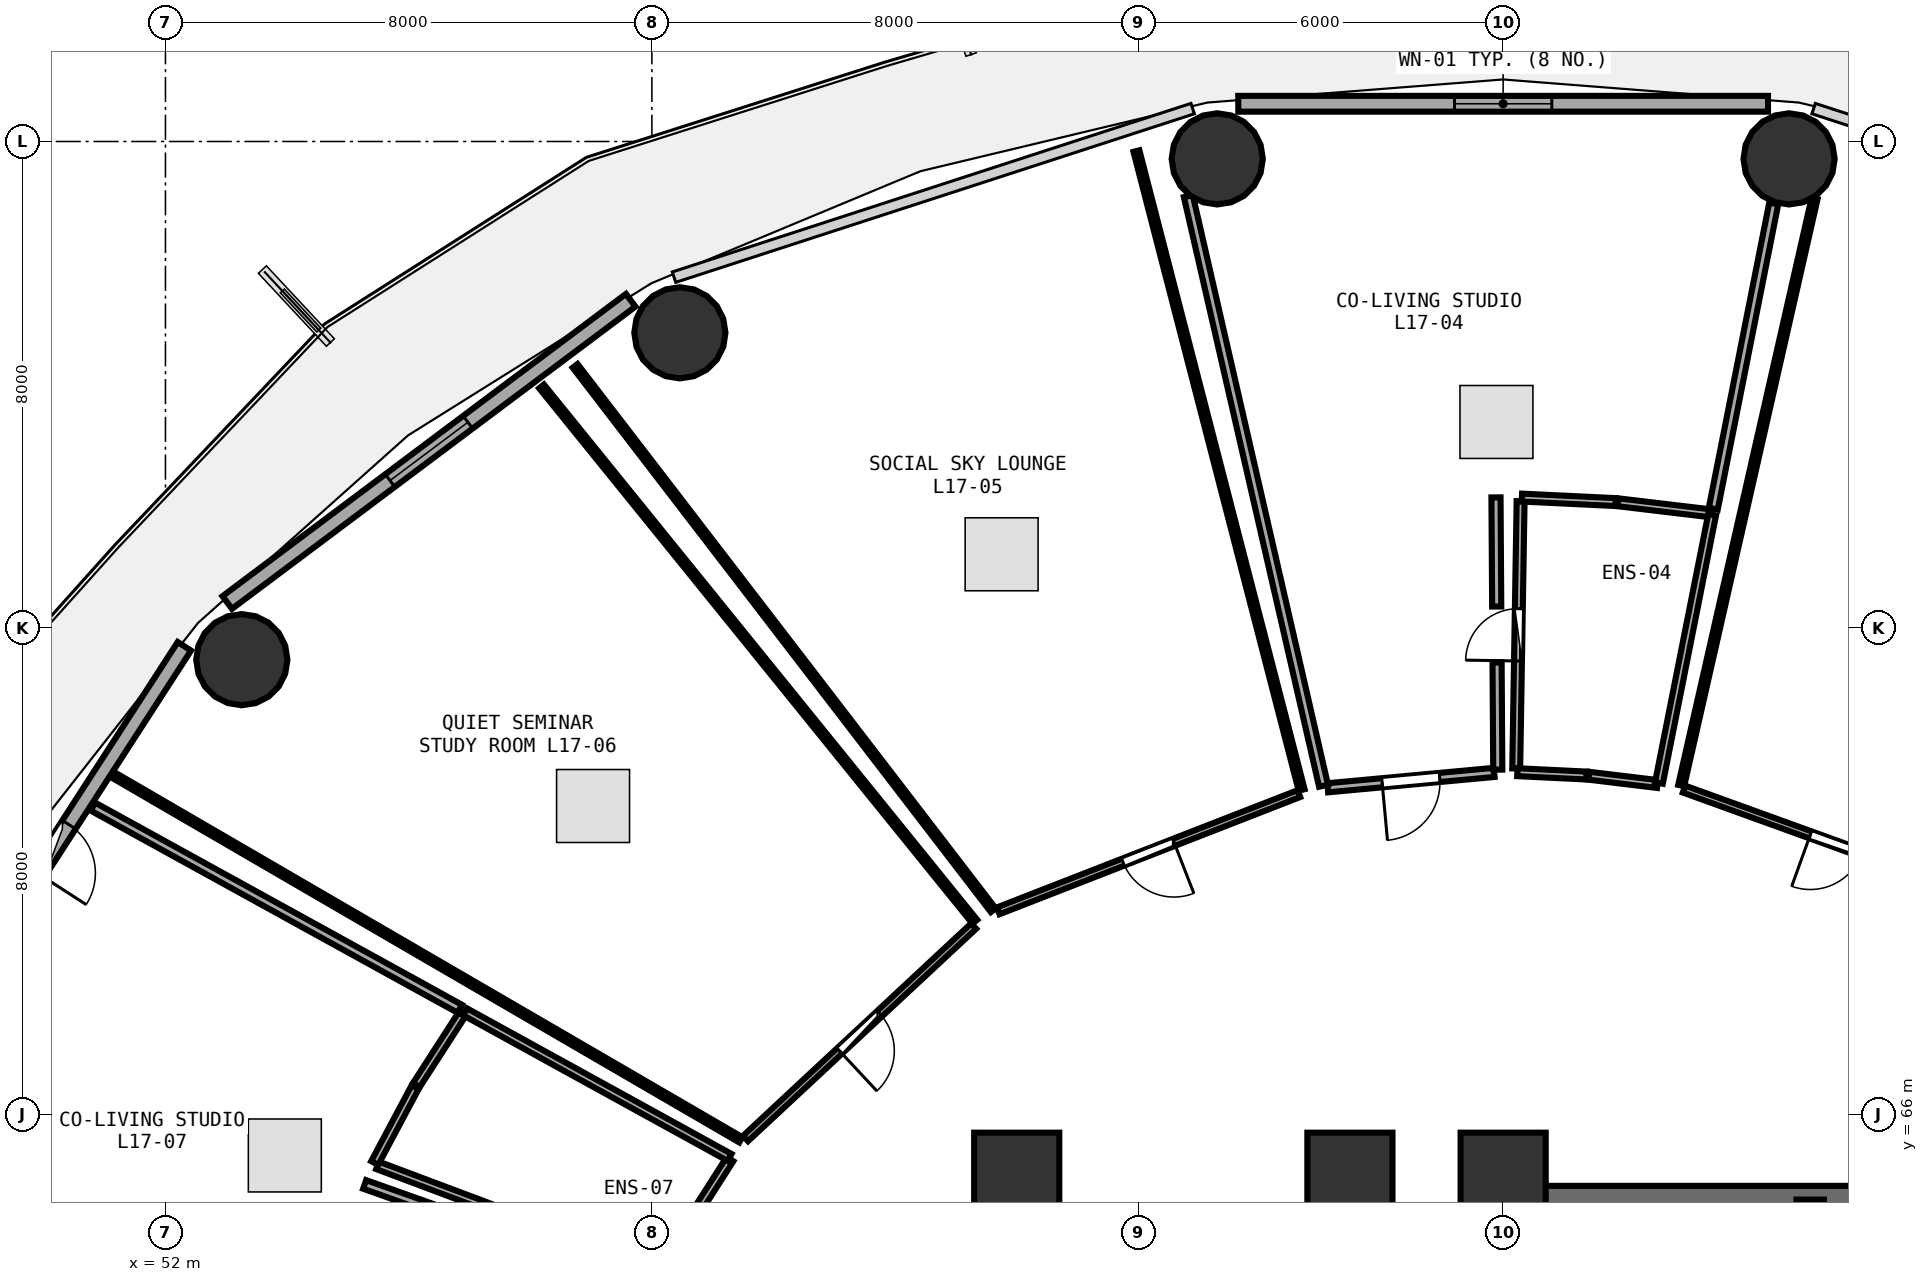
"""IFC4 building model, lengths in metres.
Left out: names, types, materials, properties, quantities, classifications, styles, units other than length and angle.
Written with IfcOpenShell. Run it as: python <this file> out.ifc"""

import sys

from ifc_helpers import new_model, si_unit, direction, frame, frame_2d, origin, origin_2d, place, context, subcontext, project, spatial, rectangle, circle, extrude, element, fill, save


model = new_model("IFC4")
c1 = context("Model", 3, precision=1e-05, world=origin(), true_north=direction((0.0, 1.0)))
c2 = subcontext(c1, "Body", "Model", "MODEL_VIEW")
j1 = project(units=[si_unit("LENGTHUNIT", "METRE"), si_unit("PLANEANGLEUNIT", "RADIAN")], contexts=[c1])
p1 = place(None, origin())
s1 = spatial("IfcSite", under=j1, at=p1, CompositionType="ELEMENT")
p2 = place(p1, origin())
s2 = spatial("IfcBuilding", under=s1, at=p2, CompositionType="ELEMENT")
p3 = place(p2, frame((0.0, 0.0, 67.5)))
s3 = spatial("IfcBuildingStorey", under=s2, at=p3, CompositionType="ELEMENT", Elevation=67.5)
for number, where, z_axis, x_axis in (
    (1, (74.0, 65.0, 0.0), (0.0, 0.0, 1.0), (1.0, 0.0, 0.0)),
    (2, (71.48, 65.0, 0.0), (0.0, 0.0, 1.0), (1.0, 0.0, 0.0)),
    (3, (66.0, 65.0, 0.0), (0.0, 0.0, 1.0), (1.0, 0.0, 0.0)),
):
    element("IfcColumn", number, at=place(p3, frame(where, z_axis=z_axis, x_axis=x_axis)), inside=s3, PredefinedType="PILASTER", context=c2, shape_type="SweptSolid", body=[
        extrude(rectangle(XDim=1.4, YDim=1.4, at=origin_2d()), origin(), (0.0, 0.0, 1.0), 4.76),
    ])
for number, where, z_axis, x_axis in (
    (4, (78.702, 81.714, 0.0), (0.0, 0.0, 1.0), (1.0, 0.0, 0.0)),
    (5, (69.298, 81.714, 0.0), (0.0, 0.0, 1.0), (1.0, 0.0, 0.0)),
    (6, (60.46, 78.854, 0.0), (0.0, 0.0, 1.0), (1.0, 0.0, 0.0)),
    (7, (53.256, 73.478, 0.0), (0.0, 0.0, 1.0), (1.0, 0.0, 0.0)),
):
    element("IfcColumn", number, at=place(p3, frame(where, z_axis=z_axis, x_axis=x_axis)), inside=s3, PredefinedType="COLUMN", context=c2, shape_type="SweptSolid", body=[
        extrude(circle(Radius=0.75, at=origin_2d()), origin(), (0.0, 0.0, 1.0), 4.76),
    ])
p4 = place(p3, frame((78.356, 82.62, 0.0), z_axis=(0.0, 0.0, 1.0), x_axis=(-1.0, 0.0, 0.0)))
e8 = element("IfcWall", 8, at=p4, inside=s3, PredefinedType="SOLIDWALL", context=c2, shape_type="SweptSolid", body=[
    extrude(rectangle(XDim=8.712, YDim=0.26, at=frame_2d((4.356, 0.0))), origin(), (0.0, 0.0, 1.0), 4.345),
])
p5 = place(p4, frame((3.556, 0.0, 0.85)))
e9 = element("IfcOpeningElement", 9, at=p5, cuts=e8, PredefinedType="OPENING", context=c2, shape_type="SweptSolid", body=[
    extrude(rectangle(XDim=1.6, YDim=1.45, at=frame_2d((0.8, 0.725))), frame((0.0, 0.14, 0.0), z_axis=(0.0, -1.0, 0.0), x_axis=(1.0, 0.0, 0.0)), (0.0, 0.0, 1.0), 0.28),
])
p6 = place(p3, frame((59.651, 79.389, 0.0), z_axis=(0.0, 0.0, 1.0), x_axis=(-0.80030733173, -0.599590005569, 0.0)))
e10 = element("IfcWall", 10, at=p6, inside=s3, PredefinedType="SOLIDWALL", context=c2, shape_type="SweptSolid", body=[
    extrude(rectangle(XDim=8.291, YDim=0.26, at=frame_2d((4.145, 0.0))), origin(), (0.0, 0.0, 1.0), 4.345),
])
p7 = place(p6, frame((3.345, 0.0, 0.85)))
e11 = element("IfcOpeningElement", 11, at=p7, cuts=e10, PredefinedType="OPENING", context=c2, shape_type="SweptSolid", body=[
    extrude(rectangle(XDim=1.6, YDim=1.45, at=frame_2d((0.8, 0.725))), frame((0.0, 0.14, 0.0), z_axis=(0.0, -1.0, 0.0), x_axis=(1.0, 0.0, 0.0)), (0.0, 0.0, 1.0), 0.28),
])
p8 = place(p3, frame((52.311, 73.698, 0.0), z_axis=(0.0, 0.0, 1.0), x_axis=(-0.543005114258, -0.839729388488, 0.0)))
e12 = element("IfcWall", 12, at=p8, inside=s3, PredefinedType="SOLIDWALL", context=c2, shape_type="SweptSolid", body=[
    extrude(rectangle(XDim=7.938, YDim=0.26, at=frame_2d((3.969, 0.0))), origin(), (0.0, 0.0, 1.0), 4.345),
])
p9 = place(p8, frame((3.494, 0.0, 0.0)))
e13 = element("IfcOpeningElement", 13, at=p9, cuts=e12, PredefinedType="OPENING", context=c2, shape_type="SweptSolid", body=[
    extrude(rectangle(XDim=0.95, YDim=2.1, at=frame_2d((0.475, 1.05))), frame((0.0, 0.14, 0.0), z_axis=(0.0, -1.0, 0.0), x_axis=(1.0, 0.0, 0.0)), (0.0, 0.0, 1.0), 0.28),
])
p10 = place(p8, frame((4.794, 0.0, 0.85)))
e14 = element("IfcOpeningElement", 14, at=p10, cuts=e12, PredefinedType="OPENING", context=c2, shape_type="SweptSolid", body=[
    extrude(rectangle(XDim=1.2, YDim=1.45, at=frame_2d((0.6, 0.725))), frame((0.0, 0.14, 0.0), z_axis=(0.0, -1.0, 0.0), x_axis=(1.0, 0.0, 0.0)), (0.0, 0.0, 1.0), 0.28),
])
p11 = place(p3, frame((74.0, 64.6, 0.0), z_axis=(0.0, 0.0, 1.0), x_axis=(1.0, 0.0, 0.0)))
e15 = element("IfcWall", 15, at=p11, inside=s3, PredefinedType="SHEAR", context=c2, shape_type="SweptSolid", body=[
    extrude(rectangle(XDim=8.0, YDim=0.45, at=frame_2d((4.0, 0.0))), origin(), (0.0, 0.0, 1.0), 4.36),
])
p12 = place(p3, frame((79.05, 58.3, 0.0), z_axis=(0.0, 0.0, 1.0), x_axis=(0.0, 1.0, 0.0)))
e16 = element("IfcWall", 16, at=p12, inside=s3, PredefinedType="SHEAR", context=c2, shape_type="SweptSolid", body=[
    extrude(rectangle(XDim=6.3, YDim=0.45, at=frame_2d((3.15, 0.0))), origin(), (0.0, 0.0, 1.0), 4.36),
])
p13 = place(p3, frame((81.975, 69.542, 0.0), z_axis=(0.0, 0.0, 1.0), x_axis=(-0.940384663849, 0.340112751891, 0.0)))
e17 = element("IfcWall", 17, at=p13, inside=s3, PredefinedType="PARTITIONING", context=c2, shape_type="SweptSolid", body=[
    extrude(rectangle(XDim=5.316, YDim=0.12, at=frame_2d((2.658, 0.0))), origin(), (0.0, 0.0, 1.0), 2.345),
])
p14 = place(p13, frame((2.208, 0.0, 0.0)))
e18 = element("IfcOpeningElement", 18, at=p14, cuts=e17, PredefinedType="OPENING", context=c2, shape_type="SweptSolid", body=[
    extrude(rectangle(XDim=0.9, YDim=2.08, at=frame_2d((0.45, 1.04))), frame((0.0, 0.07, 0.0), z_axis=(0.0, -1.0, 0.0), x_axis=(1.0, 0.0, 0.0)), (0.0, 0.0, 1.0), 0.14),
])
p15 = place(p3, frame((74.215, 71.689, 0.0), z_axis=(0.0, 0.0, 1.0), x_axis=(0.016381229396, 0.999865818659, 0.0)))
e19 = element("IfcWall", 19, at=p15, inside=s3, PredefinedType="PLUMBINGWALL", context=c2, shape_type="SweptSolid", body=[
    extrude(rectangle(XDim=4.396, YDim=0.13, at=frame_2d((2.198, 0.0))), origin(), (0.0, 0.0, 1.0), 4.045),
])
p16 = place(p15, frame((1.768, 0.0, 0.0)))
e20 = element("IfcOpeningElement", 20, at=p16, cuts=e19, PredefinedType="OPENING", context=c2, shape_type="SweptSolid", body=[
    extrude(rectangle(XDim=0.86, YDim=2.05, at=frame_2d((0.43, 1.025))), frame((0.0, 0.075, 0.0), z_axis=(0.0, -1.0, 0.0), x_axis=(1.0, 0.0, 0.0)), (0.0, 0.0, 1.0), 0.15),
])
p17 = place(p3, frame((73.852, 71.625, 0.0), z_axis=(0.0, 0.0, 1.0), x_axis=(-0.995758922583, -0.092000913564, 0.0)))
e21 = element("IfcWall", 21, at=p17, inside=s3, PredefinedType="PARTITIONING", context=c2, shape_type="SweptSolid", body=[
    extrude(rectangle(XDim=2.749, YDim=0.15, at=frame_2d((1.375, 0.0))), origin(), (0.0, 0.0, 1.0), 2.345),
])
p18 = place(p17, frame((0.9, 0.0, 0.0)))
e22 = element("IfcOpeningElement", 22, at=p18, cuts=e21, PredefinedType="OPENING", context=c2, shape_type="SweptSolid", body=[
    extrude(rectangle(XDim=0.95, YDim=2.08, at=frame_2d((0.475, 1.04))), frame((0.0, 0.085, 0.0), z_axis=(0.0, -1.0, 0.0), x_axis=(1.0, 0.0, 0.0)), (0.0, 0.0, 1.0), 0.17),
])
p19 = place(p3, frame((70.64, 71.275, 0.0), z_axis=(0.0, 0.0, 1.0), x_axis=(-0.931745460888, -0.363112098551, 0.0)))
e23 = element("IfcWall", 23, at=p19, inside=s3, PredefinedType="PARTITIONING", context=c2, shape_type="SweptSolid", body=[
    extrude(rectangle(XDim=5.308, YDim=0.12, at=frame_2d((2.654, 0.0))), origin(), (0.0, 0.0, 1.0), 2.345),
])
p20 = place(p19, frame((2.204, 0.0, 0.0)))
e24 = element("IfcOpeningElement", 24, at=p20, cuts=e23, PredefinedType="OPENING", context=c2, shape_type="SweptSolid", body=[
    extrude(rectangle(XDim=0.9, YDim=2.08, at=frame_2d((0.45, 1.04))), frame((0.0, 0.07, 0.0), z_axis=(0.0, -1.0, 0.0), x_axis=(1.0, 0.0, 0.0)), (0.0, 0.0, 1.0), 0.14),
])
p21 = place(p3, frame((65.292, 69.097, 0.0), z_axis=(0.0, 0.0, 1.0), x_axis=(-0.731919362797, -0.681391257915, 0.0)))
e25 = element("IfcWall", 25, at=p21, inside=s3, PredefinedType="PARTITIONING", context=c2, shape_type="SweptSolid", body=[
    extrude(rectangle(XDim=5.126, YDim=0.12, at=frame_2d((2.563, 0.0))), origin(), (0.0, 0.0, 1.0), 2.345),
])
p22 = place(p21, frame((2.113, 0.0, 0.0)))
e26 = element("IfcOpeningElement", 26, at=p22, cuts=e25, PredefinedType="OPENING", context=c2, shape_type="SweptSolid", body=[
    extrude(rectangle(XDim=0.9, YDim=2.08, at=frame_2d((0.45, 1.04))), frame((0.0, 0.07, 0.0), z_axis=(0.0, -1.0, 0.0), x_axis=(1.0, 0.0, 0.0)), (0.0, 0.0, 1.0), 0.14),
])
p23 = place(p3, frame((60.141, 63.416, 0.0), z_axis=(0.0, 0.0, 1.0), x_axis=(-0.93625445313, 0.351322642301, 0.0)))
e27 = element("IfcWall", 27, at=p23, inside=s3, PredefinedType="PLUMBINGWALL", context=c2, shape_type="SweptSolid", body=[
    extrude(rectangle(XDim=4.969, YDim=0.13, at=frame_2d((2.485, 0.0))), origin(), (0.0, 0.0, 1.0), 2.345),
])
p24 = place(p23, frame((2.055, 0.0, 0.0)))
e28 = element("IfcOpeningElement", 28, at=p24, cuts=e27, PredefinedType="OPENING", context=c2, shape_type="SweptSolid", body=[
    extrude(rectangle(XDim=0.86, YDim=2.05, at=frame_2d((0.43, 1.025))), frame((0.0, 0.075, 0.0), z_axis=(0.0, -1.0, 0.0), x_axis=(1.0, 0.0, 0.0)), (0.0, 0.0, 1.0), 0.15),
])
p25 = place(p3, frame((76.928, 71.409, 0.0), z_axis=(0.0, 0.0, 1.0), x_axis=(0.221583796209, 0.975141333991, 0.0)))
e29 = element("IfcWall", 29, at=p25, inside=s3, PredefinedType="PARTITIONING", context=c2, shape_type="SweptSolid", body=[
    extrude(rectangle(XDim=9.9, YDim=0.1, at=frame_2d((4.95, 0.0))), origin(), (0.0, 0.0, 1.0), 2.345),
])
p26 = place(p3, frame((76.538, 71.433, 0.0), z_axis=(0.0, 0.0, 1.0), x_axis=(-0.992788120217, 0.119882227025, 0.0)))
e30 = element("IfcWall", 30, at=p26, inside=s3, PredefinedType="PLUMBINGWALL", context=c2, shape_type="SweptSolid", body=[
    extrude(rectangle(XDim=1.136, YDim=0.13, at=frame_2d((0.568, 0.0))), origin(), (0.0, 0.0, 1.0), 4.35),
])
p27 = place(p3, frame((75.37, 71.573, 0.0), z_axis=(0.0, 0.0, 1.0), x_axis=(-0.99883340048, 0.048289109391, 0.0)))
e31 = element("IfcWall", 31, at=p27, inside=s3, PredefinedType="PLUMBINGWALL", context=c2, shape_type="SweptSolid", body=[
    extrude(rectangle(XDim=1.137, YDim=0.13, at=frame_2d((0.569, 0.0))), origin(), (0.0, 0.0, 1.0), 4.35),
])
p28 = place(p3, frame((74.308, 76.144, 0.0), z_axis=(0.0, 0.0, 1.0), x_axis=(0.998851258849, -0.047918291867, 0.0)))
e32 = element("IfcWall", 32, at=p28, inside=s3, PredefinedType="PLUMBINGWALL", context=c2, shape_type="SweptSolid", body=[
    extrude(rectangle(XDim=1.544, YDim=0.13, at=frame_2d((0.772, 0.0))), origin(), (0.0, 0.0, 1.0), 4.35),
])
p29 = place(p3, frame((75.89, 76.067, 0.0), z_axis=(0.0, 0.0, 1.0), x_axis=(0.993000658452, -0.118108815562, 0.0)))
e33 = element("IfcWall", 33, at=p29, inside=s3, PredefinedType="PLUMBINGWALL", context=c2, shape_type="SweptSolid", body=[
    extrude(rectangle(XDim=1.542, YDim=0.13, at=frame_2d((0.771, 0.0))), origin(), (0.0, 0.0, 1.0), 4.35),
])
p30 = place(p3, frame((77.437, 75.862, 0.0), z_axis=(0.0, 0.0, 1.0), x_axis=(-0.194550031261, -0.980892596229, 0.0)))
e34 = element("IfcWall", 34, at=p30, inside=s3, PredefinedType="PLUMBINGWALL", context=c2, shape_type="SweptSolid", body=[
    extrude(rectangle(XDim=4.498, YDim=0.13, at=frame_2d((2.249, 0.0))), origin(), (0.0, 0.0, 1.0), 4.045),
])
p31 = place(p3, frame((71.046, 71.405, 0.0), z_axis=(0.0, 0.0, 1.0), x_axis=(-0.223551012649, 0.97469223078, 0.0)))
e35 = element("IfcWall", 35, at=p31, inside=s3, PredefinedType="PARTITIONING", context=c2, shape_type="SweptSolid", body=[
    extrude(rectangle(XDim=9.949, YDim=0.15, at=frame_2d((4.975, 0.0))), origin(), (0.0, 0.0, 1.0), 2.345),
])
p32 = place(p3, frame((78.451, 80.981, 0.0), z_axis=(0.0, 0.0, 1.0), x_axis=(-0.194400268676, -0.980922288226, 0.0)))
e36 = element("IfcWall", 36, at=p32, inside=s3, PredefinedType="PARTITIONING", context=c2, shape_type="SweptSolid", body=[
    extrude(rectangle(XDim=5.118, YDim=0.15, at=frame_2d((2.559, 0.0))), origin(), (0.0, 0.0, 1.0), 2.345),
])
p33 = place(p3, frame((73.882, 76.147, 0.0), z_axis=(0.0, 0.0, 1.0), x_axis=(0.006530472988, -0.999978676234, 0.0)))
e37 = element("IfcWall", 37, at=p33, inside=s3, PredefinedType="PARTITIONING", context=c2, shape_type="SweptSolid", body=[
    extrude(rectangle(XDim=1.794, YDim=0.15, at=frame_2d((0.897, 0.0))), origin(), (0.0, 0.0, 1.0), 4.35),
])
p34 = place(p3, frame((73.9, 73.432, 0.0), z_axis=(0.0, 0.0, 1.0), x_axis=(0.006510459055, -0.999978806737, 0.0)))
e38 = element("IfcWall", 38, at=p34, inside=s3, PredefinedType="PARTITIONING", context=c2, shape_type="SweptSolid", body=[
    extrude(rectangle(XDim=1.762, YDim=0.15, at=frame_2d((0.881, 0.0))), origin(), (0.0, 0.0, 1.0), 4.35),
])
p35 = place(p3, frame((65.615, 69.358, 0.0), z_axis=(0.0, 0.0, 1.0), x_axis=(-0.6091849282, 0.793028198271, 0.0)))
e39 = element("IfcWall", 39, at=p35, inside=s3, PredefinedType="PARTITIONING", context=c2, shape_type="SweptSolid", body=[
    extrude(rectangle(XDim=11.289, YDim=0.1, at=frame_2d((5.645, 0.0))), origin(), (0.0, 0.0, 1.0), 2.345),
])
p36 = place(p3, frame((67.969, 81.842, 0.0), z_axis=(0.0, 0.0, 1.0), x_axis=(0.250367188866, -0.968150954521, 0.0)))
e40 = element("IfcWall", 40, at=p36, inside=s3, PredefinedType="PARTITIONING", context=c2, shape_type="SweptSolid", body=[
    extrude(rectangle(XDim=10.852, YDim=0.1, at=frame_2d((5.426, 0.0))), origin(), (0.0, 0.0, 1.0), 2.345),
])
p37 = place(p3, frame((61.461, 65.583, 0.0), z_axis=(0.0, 0.0, 1.0), x_axis=(-0.864576212426, 0.502501714333, 0.0)))
e41 = element("IfcWall", 41, at=p37, inside=s3, PredefinedType="PARTITIONING", context=c2, shape_type="SweptSolid", body=[
    extrude(rectangle(XDim=11.9, YDim=0.1, at=frame_2d((5.95, 0.0))), origin(), (0.0, 0.0, 1.0), 2.345),
])
p38 = place(p3, frame((58.185, 77.973, 0.0), z_axis=(0.0, 0.0, 1.0), x_axis=(0.629127534858, -0.777302093708, 0.0)))
e42 = element("IfcWall", 42, at=p38, inside=s3, PredefinedType="PARTITIONING", context=c2, shape_type="SweptSolid", body=[
    extrude(rectangle(XDim=11.326, YDim=0.1, at=frame_2d((5.663, 0.0))), origin(), (0.0, 0.0, 1.0), 2.345),
])
p39 = place(p3, frame((61.285, 65.266, 0.0), z_axis=(0.0, 0.0, 1.0), x_axis=(-0.53816125517, -0.842841897057, 0.0)))
e43 = element("IfcWall", 43, at=p39, inside=s3, PredefinedType="PLUMBINGWALL", context=c2, shape_type="SweptSolid", body=[
    extrude(rectangle(XDim=1.056, YDim=0.13, at=frame_2d((0.528, 0.0))), origin(), (0.0, 0.0, 1.0), 2.345),
])
p40 = place(p3, frame((55.441, 65.201, 0.0), z_axis=(0.0, 0.0, 1.0), x_axis=(0.470471737127, 0.882415063654, 0.0)))
e44 = element("IfcWall", 44, at=p40, inside=s3, PredefinedType="PLUMBINGWALL", context=c2, shape_type="SweptSolid", body=[
    extrude(rectangle(XDim=1.414, YDim=0.13, at=frame_2d((0.707, 0.0))), origin(), (0.0, 0.0, 1.0), 2.345),
])
p41 = place(p3, frame((56.127, 66.483, 0.0), z_axis=(0.0, 0.0, 1.0), x_axis=(0.542142481081, 0.840286576239, 0.0)))
e45 = element("IfcWall", 45, at=p41, inside=s3, PredefinedType="PLUMBINGWALL", context=c2, shape_type="SweptSolid", body=[
    extrude(rectangle(XDim=1.425, YDim=0.13, at=frame_2d((0.712, 0.0))), origin(), (0.0, 0.0, 1.0), 4.35),
])
p42 = place(p3, frame((56.927, 67.688, 0.0), z_axis=(0.0, 0.0, 1.0), x_axis=(0.87605188001, -0.48221686359, 0.0)))
e46 = element("IfcWall", 46, at=p42, inside=s3, PredefinedType="PLUMBINGWALL", context=c2, shape_type="SweptSolid", body=[
    extrude(rectangle(XDim=4.967, YDim=0.13, at=frame_2d((2.483, 0.0))), origin(), (0.0, 0.0, 1.0), 2.345),
])
p43 = place(p3, frame((50.807, 71.062, 0.0), z_axis=(0.0, 0.0, 1.0), x_axis=(0.875868518132, -0.482549830531, 0.0)))
e47 = element("IfcWall", 47, at=p43, inside=s3, PredefinedType="PARTITIONING", context=c2, shape_type="SweptSolid", body=[
    extrude(rectangle(XDim=6.889, YDim=0.15, at=frame_2d((3.445, 0.0))), origin(), (0.0, 0.0, 1.0), 2.345),
])
p44 = place(p3, frame((55.276, 64.849, 0.0), z_axis=(0.0, 0.0, 1.0), x_axis=(0.942346688621, -0.334638190357, 0.0)))
e48 = element("IfcWall", 48, at=p44, inside=s3, PredefinedType="PARTITIONING", context=c2, shape_type="SweptSolid", body=[
    extrude(rectangle(XDim=2.114, YDim=0.15, at=frame_2d((1.057, 0.0))), origin(), (0.0, 0.0, 1.0), 4.045),
])
p45 = place(p5, origin())
e49 = element("IfcWindow", 49, at=p45, inside=s3, PartitioningType="SINGLE_PANEL", PredefinedType="WINDOW", context=c2, shape_type="SweptSolid", body=[
    extrude(rectangle(XDim=1.6, YDim=1.45, at=frame_2d((0.8, 0.725))), frame((0.0, 0.03, 0.0), z_axis=(0.0, -1.0, 0.0), x_axis=(1.0, 0.0, 0.0)), (0.0, 0.0, 1.0), 0.06),
])
fill(e9, e49)
p46 = place(p7, origin())
e50 = element("IfcWindow", 50, at=p46, inside=s3, PartitioningType="SINGLE_PANEL", PredefinedType="WINDOW", context=c2, shape_type="SweptSolid", body=[
    extrude(rectangle(XDim=1.6, YDim=1.45, at=frame_2d((0.8, 0.725))), frame((0.0, 0.03, 0.0), z_axis=(0.0, -1.0, 0.0), x_axis=(1.0, 0.0, 0.0)), (0.0, 0.0, 1.0), 0.06),
])
fill(e11, e50)
p47 = place(p9, frame((0.95, 0.0, 0.0), z_axis=(0.0, 0.0, 1.0), x_axis=(-1.0, 0.0, 0.0)))
e51 = element("IfcDoor", 51, at=p47, inside=s3, OperationType="SINGLE_SWING_LEFT", PredefinedType="DOOR", context=c2, shape_type="SweptSolid", body=[
    extrude(rectangle(XDim=0.95, YDim=2.1, at=frame_2d((0.475, 1.05))), frame((0.0, 0.025, 0.0), z_axis=(0.0, -1.0, 0.0), x_axis=(1.0, 0.0, 0.0)), (0.0, 0.0, 1.0), 0.05),
])
fill(e13, e51)
p48 = place(p14, origin())
e52 = element("IfcDoor", 52, at=p48, inside=s3, OperationType="SINGLE_SWING_RIGHT", PredefinedType="DOOR", context=c2, shape_type="SweptSolid", body=[
    extrude(rectangle(XDim=0.9, YDim=2.08, at=frame_2d((0.45, 1.04))), frame((0.0, 0.025, 0.0), z_axis=(0.0, -1.0, 0.0), x_axis=(1.0, 0.0, 0.0)), (0.0, 0.0, 1.0), 0.05),
])
fill(e18, e52)
p49 = place(p16, origin())
e53 = element("IfcDoor", 53, at=p49, inside=s3, OperationType="SINGLE_SWING_LEFT", PredefinedType="DOOR", context=c2, shape_type="SweptSolid", body=[
    extrude(rectangle(XDim=0.86, YDim=2.05, at=frame_2d((0.43, 1.025))), frame((0.0, 0.025, 0.0), z_axis=(0.0, -1.0, 0.0), x_axis=(1.0, 0.0, 0.0)), (0.0, 0.0, 1.0), 0.05),
])
fill(e20, e53)
p50 = place(p18, origin())
e54 = element("IfcDoor", 54, at=p50, inside=s3, OperationType="SINGLE_SWING_RIGHT", PredefinedType="DOOR", context=c2, shape_type="SweptSolid", body=[
    extrude(rectangle(XDim=0.95, YDim=2.08, at=frame_2d((0.475, 1.04))), frame((0.0, 0.025, 0.0), z_axis=(0.0, -1.0, 0.0), x_axis=(1.0, 0.0, 0.0)), (0.0, 0.0, 1.0), 0.05),
])
fill(e22, e54)
p51 = place(p20, origin())
e55 = element("IfcDoor", 55, at=p51, inside=s3, OperationType="SINGLE_SWING_LEFT", PredefinedType="DOOR", context=c2, shape_type="SweptSolid", body=[
    extrude(rectangle(XDim=0.9, YDim=2.08, at=frame_2d((0.45, 1.04))), frame((0.0, 0.025, 0.0), z_axis=(0.0, -1.0, 0.0), x_axis=(1.0, 0.0, 0.0)), (0.0, 0.0, 1.0), 0.05),
])
fill(e24, e55)
p52 = place(p22, origin())
e56 = element("IfcDoor", 56, at=p52, inside=s3, OperationType="SINGLE_SWING_RIGHT", PredefinedType="DOOR", context=c2, shape_type="SweptSolid", body=[
    extrude(rectangle(XDim=0.9, YDim=2.08, at=frame_2d((0.45, 1.04))), frame((0.0, 0.025, 0.0), z_axis=(0.0, -1.0, 0.0), x_axis=(1.0, 0.0, 0.0)), (0.0, 0.0, 1.0), 0.05),
])
fill(e26, e56)
save(model, sys.argv[1])
